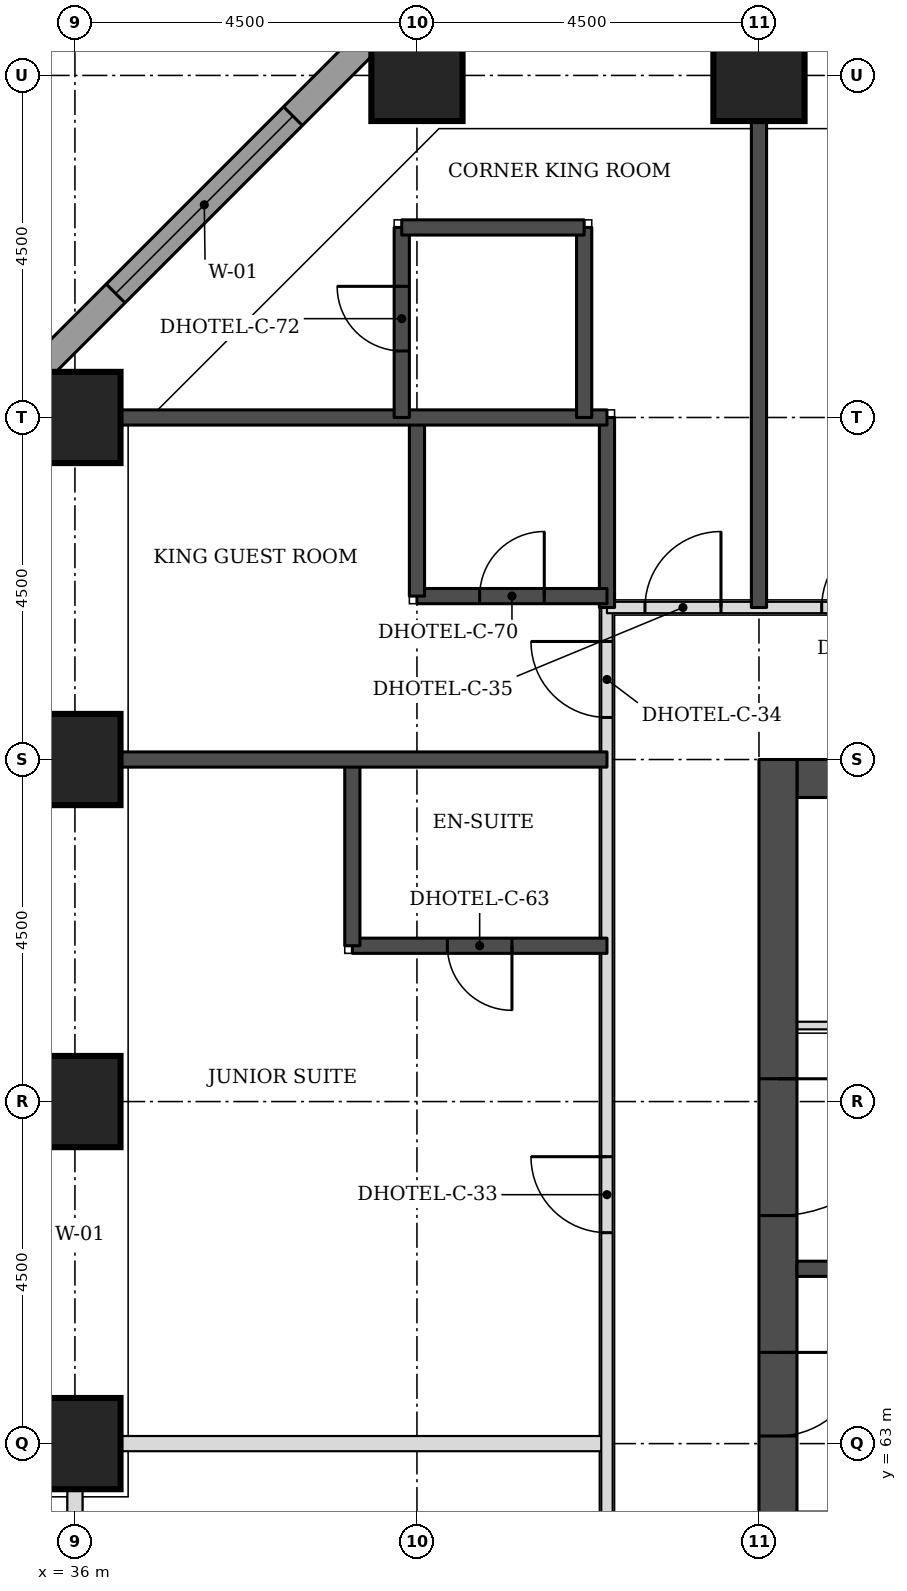
"""IFC4 building model, lengths in metres.
Left out: names, types, materials, properties, quantities, classifications, styles, units other than length and angle.
Written with IfcOpenShell. Run it as: python <this file> out.ifc"""

import sys

from ifc_helpers import new_model, si_unit, direction, frame, frame_2d, origin, origin_2d, place, context, subcontext, project, spatial, rectangle, extrude, element, fill, save


model = new_model("IFC4")
c1 = context("Model", 3, precision=1e-05, world=origin(), true_north=direction((0.0, 1.0)))
c2 = subcontext(c1, "Body", "Model", "MODEL_VIEW")
j1 = project(units=[si_unit("LENGTHUNIT", "METRE"), si_unit("PLANEANGLEUNIT", "RADIAN")], contexts=[c1])
p1 = place(None, origin())
s1 = spatial("IfcSite", under=j1, at=p1, CompositionType="ELEMENT")
p2 = place(p1, origin())
s2 = spatial("IfcBuilding", under=s1, at=p2, CompositionType="ELEMENT")
p3 = place(p2, frame((0.0, 0.0, 56.1)))
s3 = spatial("IfcBuildingStorey", under=s2, at=p3, CompositionType="ELEMENT", Elevation=56.1)
for number, where, z_axis, x_axis in (
    (1, (36.0, 63.0, 0.0), (0.0, 0.0, 1.0), (1.0, 0.0, 0.0)),
    (2, (36.0, 67.5, 0.0), (0.0, 0.0, 1.0), (1.0, 0.0, 0.0)),
    (3, (36.0, 72.0, 0.0), (0.0, 0.0, 1.0), (1.0, 0.0, 0.0)),
    (4, (36.0, 76.5, 0.0), (0.0, 0.0, 1.0), (1.0, 0.0, 0.0)),
    (5, (40.5, 81.0, 0.0), (0.0, 0.0, 1.0), (1.0, 0.0, 0.0)),
    (6, (45.0, 81.0, 0.0), (0.0, 0.0, 1.0), (1.0, 0.0, 0.0)),
):
    element("IfcColumn", number, at=place(p3, frame(where, z_axis=z_axis, x_axis=x_axis)), inside=s3, PredefinedType="COLUMN", context=c2, shape_type="SweptSolid", body=[
        extrude(rectangle(XDim=1.2, YDim=1.2, at=origin_2d()), origin(), (0.0, 0.0, 1.0), 3.3),
    ])
p4 = place(p3, frame((45.5, 71.75, 0.0), z_axis=(0.0, 0.0, 1.0), x_axis=(1.0, 0.0, 0.0)))
e7 = element("IfcWall", 7, at=p4, inside=s3, PredefinedType="SHEAR", context=c2, shape_type="SweptSolid", body=[
    extrude(rectangle(XDim=21.5, YDim=0.5, at=frame_2d((10.75, 0.0))), origin(), (0.0, 0.0, 1.0), 3.3),
])
p5 = place(p3, frame((45.25, 49.5, 0.0), z_axis=(0.0, 0.0, 1.0), x_axis=(0.0, 1.0, 0.0)))
e8 = element("IfcWall", 8, at=p5, inside=s3, PredefinedType="SHEAR", context=c2, shape_type="SweptSolid", body=[
    extrude(rectangle(XDim=22.5, YDim=0.5, at=frame_2d((11.25, 0.0))), origin(), (0.0, 0.0, 1.0), 3.3),
])
p6 = place(p5, frame((4.2, 0.0, 0.0)))
e9 = element("IfcOpeningElement", 9, at=p6, cuts=e8, PredefinedType="OPENING", context=c2, shape_type="SweptSolid", body=[
    extrude(rectangle(XDim=1.8, YDim=2.1, at=frame_2d((0.9, 1.05))), frame((0.0, 0.26, 0.0), z_axis=(0.0, -1.0, 0.0), x_axis=(1.0, 0.0, 0.0)), (0.0, 0.0, 1.0), 0.52),
])
p7 = place(p5, frame((6.9, 0.0, 0.0)))
e10 = element("IfcOpeningElement", 10, at=p7, cuts=e8, PredefinedType="OPENING", context=c2, shape_type="SweptSolid", body=[
    extrude(rectangle(XDim=1.1, YDim=2.1, at=frame_2d((0.55, 1.05))), frame((0.0, 0.26, 0.0), z_axis=(0.0, -1.0, 0.0), x_axis=(1.0, 0.0, 0.0)), (0.0, 0.0, 1.0), 0.52),
])
p8 = place(p5, frame((13.6, 0.0, 0.0)))
e11 = element("IfcOpeningElement", 11, at=p8, cuts=e8, PredefinedType="OPENING", context=c2, shape_type="SweptSolid", body=[
    extrude(rectangle(XDim=1.1, YDim=2.1, at=frame_2d((0.55, 1.05))), frame((0.0, 0.26, 0.0), z_axis=(0.0, -1.0, 0.0), x_axis=(1.0, 0.0, 0.0)), (0.0, 0.0, 1.0), 0.52),
])
p9 = place(p5, frame((16.5, 0.0, 0.0)))
e12 = element("IfcOpeningElement", 12, at=p9, cuts=e8, PredefinedType="OPENING", context=c2, shape_type="SweptSolid", body=[
    extrude(rectangle(XDim=1.8, YDim=2.1, at=frame_2d((0.9, 1.05))), frame((0.0, 0.26, 0.0), z_axis=(0.0, -1.0, 0.0), x_axis=(1.0, 0.0, 0.0)), (0.0, 0.0, 1.0), 0.52),
])
p10 = place(p3, frame((40.23, 81.826, 0.0), z_axis=(0.0, 0.0, 1.0), x_axis=(-0.707106781187, -0.707106781187, 0.0)))
e13 = element("IfcWall", 13, at=p10, inside=s3, PredefinedType="STANDARD", context=c2, shape_type="SweptSolid", body=[
    extrude(rectangle(XDim=7.151, YDim=0.35, at=frame_2d((3.576, 0.0))), origin(), (0.0, 0.0, 1.0), 3.055),
])
p11 = place(p10, frame((1.926, 0.0, 0.8)))
e14 = element("IfcOpeningElement", 14, at=p11, cuts=e13, PredefinedType="OPENING", context=c2, shape_type="SweptSolid", body=[
    extrude(rectangle(XDim=3.3, YDim=1.5, at=frame_2d((1.65, 0.75))), frame((0.0, 0.185, 0.0), z_axis=(0.0, -1.0, 0.0), x_axis=(1.0, 0.0, 0.0)), (0.0, 0.0, 1.0), 0.37),
])
p12 = place(p3, frame((36.0, 56.0, 0.0), z_axis=(0.0, 0.0, 1.0), x_axis=(0.0, 1.0, 0.0)))
e15 = element("IfcWall", 15, at=p12, inside=s3, PredefinedType="PARTITIONING", context=c2, shape_type="SweptSolid", body=[
    extrude(rectangle(XDim=6.4, YDim=0.2, at=frame_2d((3.2, 0.0))), origin(), (0.0, 0.0, 1.0), 2.33),
])
p13 = place(p3, frame((36.6, 63.0, 0.0), z_axis=(0.0, 0.0, 1.0), x_axis=(1.0, 0.0, 0.0)))
e16 = element("IfcWall", 16, at=p13, inside=s3, PredefinedType="PARTITIONING", context=c2, shape_type="SweptSolid", body=[
    extrude(rectangle(XDim=6.4, YDim=0.2, at=frame_2d((3.2, 0.0))), origin(), (0.0, 0.0, 1.0), 3.08),
])
p14 = place(p3, frame((43.0, 56.0, 0.0), z_axis=(0.0, 0.0, 1.0), x_axis=(0.0, 1.0, 0.0)))
e17 = element("IfcWall", 17, at=p14, inside=s3, PredefinedType="PARTITIONING", context=c2, shape_type="SweptSolid", body=[
    extrude(rectangle(XDim=18.0, YDim=0.15, at=frame_2d((9.0, 0.0))), origin(), (0.0, 0.0, 1.0), 3.08),
])
p15 = place(p14, frame((9.775, 0.0, 0.0)))
e18 = element("IfcOpeningElement", 18, at=p15, cuts=e17, PredefinedType="OPENING", context=c2, shape_type="SweptSolid", body=[
    extrude(rectangle(XDim=1.0, YDim=2.1, at=frame_2d((0.5, 1.05))), frame((0.0, 0.085, 0.0), z_axis=(0.0, -1.0, 0.0), x_axis=(1.0, 0.0, 0.0)), (0.0, 0.0, 1.0), 0.17),
])
p16 = place(p14, frame((16.553, 0.0, 0.0)))
e19 = element("IfcOpeningElement", 19, at=p16, cuts=e17, PredefinedType="OPENING", context=c2, shape_type="SweptSolid", body=[
    extrude(rectangle(XDim=1.0, YDim=2.1, at=frame_2d((0.5, 1.05))), frame((0.0, 0.085, 0.0), z_axis=(0.0, -1.0, 0.0), x_axis=(1.0, 0.0, 0.0)), (0.0, 0.0, 1.0), 0.17),
])
p17 = place(p14, frame((3.05, 0.0, 0.0)))
e20 = element("IfcOpeningElement", 20, at=p17, cuts=e17, PredefinedType="OPENING", context=c2, shape_type="SweptSolid", body=[
    extrude(rectangle(XDim=0.9, YDim=2.1, at=frame_2d((0.45, 1.05))), frame((0.0, 0.085, 0.0), z_axis=(0.0, -1.0, 0.0), x_axis=(1.0, 0.0, 0.0)), (0.0, 0.0, 1.0), 0.17),
])
p18 = place(p3, frame((43.0, 74.0, 0.0), z_axis=(0.0, 0.0, 1.0), x_axis=(1.0, 0.0, 0.0)))
e21 = element("IfcWall", 21, at=p18, inside=s3, PredefinedType="PARTITIONING", context=c2, shape_type="SweptSolid", body=[
    extrude(rectangle(XDim=26.5, YDim=0.15, at=frame_2d((13.25, 0.0))), origin(), (0.0, 0.0, 1.0), 3.08),
])
p19 = place(p18, frame((2.825, 0.0, 0.0)))
e22 = element("IfcOpeningElement", 22, at=p19, cuts=e21, PredefinedType="OPENING", context=c2, shape_type="SweptSolid", body=[
    extrude(rectangle(XDim=1.0, YDim=2.1, at=frame_2d((0.5, 1.05))), frame((0.0, 0.085, 0.0), z_axis=(0.0, -1.0, 0.0), x_axis=(1.0, 0.0, 0.0)), (0.0, 0.0, 1.0), 0.17),
])
p20 = place(p18, frame((9.425, 0.0, 0.0)))
e23 = element("IfcOpeningElement", 23, at=p20, cuts=e21, PredefinedType="OPENING", context=c2, shape_type="SweptSolid", body=[
    extrude(rectangle(XDim=1.0, YDim=2.1, at=frame_2d((0.5, 1.05))), frame((0.0, 0.085, 0.0), z_axis=(0.0, -1.0, 0.0), x_axis=(1.0, 0.0, 0.0)), (0.0, 0.0, 1.0), 0.17),
])
p21 = place(p18, frame((11.825, 0.0, 0.0)))
e24 = element("IfcOpeningElement", 24, at=p21, cuts=e21, PredefinedType="OPENING", context=c2, shape_type="SweptSolid", body=[
    extrude(rectangle(XDim=1.0, YDim=2.1, at=frame_2d((0.5, 1.05))), frame((0.0, 0.085, 0.0), z_axis=(0.0, -1.0, 0.0), x_axis=(1.0, 0.0, 0.0)), (0.0, 0.0, 1.0), 0.17),
])
p22 = place(p18, frame((18.425, 0.0, 0.0)))
e25 = element("IfcOpeningElement", 25, at=p22, cuts=e21, PredefinedType="OPENING", context=c2, shape_type="SweptSolid", body=[
    extrude(rectangle(XDim=1.0, YDim=2.1, at=frame_2d((0.5, 1.05))), frame((0.0, 0.085, 0.0), z_axis=(0.0, -1.0, 0.0), x_axis=(1.0, 0.0, 0.0)), (0.0, 0.0, 1.0), 0.17),
])
p23 = place(p18, frame((20.825, 0.0, 0.0)))
e26 = element("IfcOpeningElement", 26, at=p23, cuts=e21, PredefinedType="OPENING", context=c2, shape_type="SweptSolid", body=[
    extrude(rectangle(XDim=1.0, YDim=2.1, at=frame_2d((0.5, 1.05))), frame((0.0, 0.085, 0.0), z_axis=(0.0, -1.0, 0.0), x_axis=(1.0, 0.0, 0.0)), (0.0, 0.0, 1.0), 0.17),
])
p24 = place(p18, frame((0.5, 0.0, 0.0)))
e27 = element("IfcOpeningElement", 27, at=p24, cuts=e21, PredefinedType="OPENING", context=c2, shape_type="SweptSolid", body=[
    extrude(rectangle(XDim=1.0, YDim=2.1, at=frame_2d((0.5, 1.05))), frame((0.0, 0.085, 0.0), z_axis=(0.0, -1.0, 0.0), x_axis=(1.0, 0.0, 0.0)), (0.0, 0.0, 1.0), 0.17),
])
p25 = place(p18, frame((25.0, 0.0, 0.0)))
e28 = element("IfcOpeningElement", 28, at=p25, cuts=e21, PredefinedType="OPENING", context=c2, shape_type="SweptSolid", body=[
    extrude(rectangle(XDim=1.0, YDim=2.1, at=frame_2d((0.5, 1.05))), frame((0.0, 0.085, 0.0), z_axis=(0.0, -1.0, 0.0), x_axis=(1.0, 0.0, 0.0)), (0.0, 0.0, 1.0), 0.17),
])
p26 = place(p3, frame((39.65, 69.55, 0.0), z_axis=(0.0, 0.0, 1.0), x_axis=(1.0, 0.0, 0.0)))
e29 = element("IfcWall", 29, at=p26, inside=s3, PredefinedType="SOLIDWALL", context=c2, shape_type="SweptSolid", body=[
    extrude(rectangle(XDim=3.35, YDim=0.2, at=frame_2d((1.675, 0.0))), origin(), (0.0, 0.0, 1.0), 3.08),
])
p27 = place(p26, frame((1.25, 0.0, 0.0)))
e30 = element("IfcOpeningElement", 30, at=p27, cuts=e29, PredefinedType="OPENING", context=c2, shape_type="SweptSolid", body=[
    extrude(rectangle(XDim=0.85, YDim=2.1, at=frame_2d((0.425, 1.05))), frame((0.0, 0.11, 0.0), z_axis=(0.0, -1.0, 0.0), x_axis=(1.0, 0.0, 0.0)), (0.0, 0.0, 1.0), 0.22),
])
p28 = place(p3, frame((39.65, 69.55, 0.0), z_axis=(0.0, 0.0, 1.0), x_axis=(0.0, 1.0, 0.0)))
e31 = element("IfcWall", 31, at=p28, inside=s3, PredefinedType="SOLIDWALL", context=c2, shape_type="SweptSolid", body=[
    extrude(rectangle(XDim=2.45, YDim=0.2, at=frame_2d((1.225, 0.0))), origin(), (0.0, 0.0, 1.0), 3.08),
])
p29 = place(p3, frame((36.6, 72.0, 0.0), z_axis=(0.0, 0.0, 1.0), x_axis=(1.0, 0.0, 0.0)))
e32 = element("IfcWall", 32, at=p29, inside=s3, PredefinedType="SOLIDWALL", context=c2, shape_type="SweptSolid", body=[
    extrude(rectangle(XDim=6.4, YDim=0.2, at=frame_2d((3.2, 0.0))), origin(), (0.0, 0.0, 1.0), 3.08),
])
p30 = place(p3, frame((43.0, 74.0, 0.0), z_axis=(0.0, 0.0, 1.0), x_axis=(0.0, 1.0, 0.0)))
e33 = element("IfcWall", 33, at=p30, inside=s3, PredefinedType="SOLIDWALL", context=c2, shape_type="SweptSolid", body=[
    extrude(rectangle(XDim=2.5, YDim=0.2, at=frame_2d((1.25, 0.0))), origin(), (0.0, 0.0, 1.0), 3.08),
])
p31 = place(p3, frame((45.0, 74.0, 0.0), z_axis=(0.0, 0.0, 1.0), x_axis=(0.0, 1.0, 0.0)))
e34 = element("IfcWall", 34, at=p31, inside=s3, PredefinedType="SOLIDWALL", context=c2, shape_type="SweptSolid", body=[
    extrude(rectangle(XDim=6.4, YDim=0.2, at=frame_2d((3.2, 0.0))), origin(), (0.0, 0.0, 1.0), 3.08),
])
p32 = place(p3, frame((40.5, 74.15, 0.0), z_axis=(0.0, 0.0, 1.0), x_axis=(1.0, 0.0, 0.0)))
e35 = element("IfcWall", 35, at=p32, inside=s3, PredefinedType="SOLIDWALL", context=c2, shape_type="SweptSolid", body=[
    extrude(rectangle(XDim=2.5, YDim=0.2, at=frame_2d((1.25, 0.0))), origin(), (0.0, 0.0, 1.0), 3.08),
])
p33 = place(p32, frame((0.825, 0.0, 0.0)))
e36 = element("IfcOpeningElement", 36, at=p33, cuts=e35, PredefinedType="OPENING", context=c2, shape_type="SweptSolid", body=[
    extrude(rectangle(XDim=0.85, YDim=2.1, at=frame_2d((0.425, 1.05))), frame((0.0, 0.11, 0.0), z_axis=(0.0, -1.0, 0.0), x_axis=(1.0, 0.0, 0.0)), (0.0, 0.0, 1.0), 0.22),
])
p34 = place(p3, frame((40.5, 74.15, 0.0), z_axis=(0.0, 0.0, 1.0), x_axis=(0.0, 1.0, 0.0)))
e37 = element("IfcWall", 37, at=p34, inside=s3, PredefinedType="SOLIDWALL", context=c2, shape_type="SweptSolid", body=[
    extrude(rectangle(XDim=2.35, YDim=0.2, at=frame_2d((1.175, 0.0))), origin(), (0.0, 0.0, 1.0), 3.08),
])
p35 = place(p3, frame((36.6, 76.5, 0.0), z_axis=(0.0, 0.0, 1.0), x_axis=(1.0, 0.0, 0.0)))
e38 = element("IfcWall", 38, at=p35, inside=s3, PredefinedType="SOLIDWALL", context=c2, shape_type="SweptSolid", body=[
    extrude(rectangle(XDim=6.4, YDim=0.2, at=frame_2d((3.2, 0.0))), origin(), (0.0, 0.0, 1.0), 3.08),
])
p36 = place(p3, frame((40.3, 76.5, 0.0), z_axis=(0.0, 0.0, 1.0), x_axis=(0.0, 1.0, 0.0)))
e39 = element("IfcWall", 39, at=p36, inside=s3, PredefinedType="SOLIDWALL", context=c2, shape_type="SweptSolid", body=[
    extrude(rectangle(XDim=2.5, YDim=0.2, at=frame_2d((1.25, 0.0))), origin(), (0.0, 0.0, 1.0), 3.08),
])
p37 = place(p36, frame((0.875, 0.0, 0.0)))
e40 = element("IfcOpeningElement", 40, at=p37, cuts=e39, PredefinedType="OPENING", context=c2, shape_type="SweptSolid", body=[
    extrude(rectangle(XDim=0.85, YDim=2.1, at=frame_2d((0.425, 1.05))), frame((0.0, 0.11, 0.0), z_axis=(0.0, -1.0, 0.0), x_axis=(1.0, 0.0, 0.0)), (0.0, 0.0, 1.0), 0.22),
])
p38 = place(p3, frame((42.7, 76.5, 0.0), z_axis=(0.0, 0.0, 1.0), x_axis=(0.0, 1.0, 0.0)))
e41 = element("IfcWall", 41, at=p38, inside=s3, PredefinedType="SOLIDWALL", context=c2, shape_type="SweptSolid", body=[
    extrude(rectangle(XDim=2.5, YDim=0.2, at=frame_2d((1.25, 0.0))), origin(), (0.0, 0.0, 1.0), 3.08),
])
p39 = place(p3, frame((40.3, 79.0, 0.0), z_axis=(0.0, 0.0, 1.0), x_axis=(1.0, 0.0, 0.0)))
e42 = element("IfcWall", 42, at=p39, inside=s3, PredefinedType="SOLIDWALL", context=c2, shape_type="SweptSolid", body=[
    extrude(rectangle(XDim=2.4, YDim=0.2, at=frame_2d((1.2, 0.0))), origin(), (0.0, 0.0, 1.0), 3.08),
])
p40 = place(p3, frame((45.5, 65.3, 0.0), z_axis=(0.0, 0.0, 1.0), x_axis=(1.0, 0.0, 0.0)))
e43 = element("IfcWall", 43, at=p40, inside=s3, PredefinedType="SOLIDWALL", context=c2, shape_type="SweptSolid", body=[
    extrude(rectangle(XDim=2.3, YDim=0.2, at=frame_2d((1.15, 0.0))), origin(), (0.0, 0.0, 1.0), 3.08),
])
p41 = place(p3, frame((45.5, 68.5, 0.0), z_axis=(0.0, 0.0, 1.0), x_axis=(1.0, 0.0, 0.0)))
e44 = element("IfcWall", 44, at=p41, inside=s3, PredefinedType="PARTITIONING", context=c2, shape_type="SweptSolid", body=[
    extrude(rectangle(XDim=5.15, YDim=0.1, at=frame_2d((2.575, 0.0))), origin(), (0.0, 0.0, 1.0), 3.08),
])
p42 = place(p41, frame((0.837, 0.0, 0.0)))
e45 = element("IfcOpeningElement", 45, at=p42, cuts=e44, PredefinedType="OPENING", context=c2, shape_type="SweptSolid", body=[
    extrude(rectangle(XDim=0.9, YDim=2.1, at=frame_2d((0.45, 1.05))), frame((0.0, 0.06, 0.0), z_axis=(0.0, -1.0, 0.0), x_axis=(1.0, 0.0, 0.0)), (0.0, 0.0, 1.0), 0.12),
])
p43 = place(p41, frame((3.413, 0.0, 0.0)))
e46 = element("IfcOpeningElement", 46, at=p43, cuts=e44, PredefinedType="OPENING", context=c2, shape_type="SweptSolid", body=[
    extrude(rectangle(XDim=0.9, YDim=2.1, at=frame_2d((0.45, 1.05))), frame((0.0, 0.06, 0.0), z_axis=(0.0, -1.0, 0.0), x_axis=(1.0, 0.0, 0.0)), (0.0, 0.0, 1.0), 0.12),
])
p44 = place(p11, origin())
e47 = element("IfcWindow", 47, at=p44, inside=s3, PartitioningType="SINGLE_PANEL", PredefinedType="WINDOW", context=c2, shape_type="SweptSolid", body=[
    extrude(rectangle(XDim=3.3, YDim=1.5, at=frame_2d((1.65, 0.75))), frame((0.0, 0.085, 0.0), z_axis=(0.0, -1.0, 0.0), x_axis=(1.0, 0.0, 0.0)), (0.0, 0.0, 1.0), 0.06),
])
fill(e14, e47)
p45 = place(p15, origin())
e48 = element("IfcDoor", 48, at=p45, inside=s3, OperationType="SINGLE_SWING_RIGHT", PredefinedType="DOOR", context=c2, shape_type="SweptSolid", body=[
    extrude(rectangle(XDim=1.0, YDim=2.1, at=frame_2d((0.5, 1.05))), frame((0.0, 0.025, 0.0), z_axis=(0.0, -1.0, 0.0), x_axis=(1.0, 0.0, 0.0)), (0.0, 0.0, 1.0), 0.05),
])
fill(e18, e48)
p46 = place(p27, frame((0.85, 0.0, 0.0), z_axis=(0.0, 0.0, 1.0), x_axis=(-1.0, 0.0, 0.0)))
e49 = element("IfcDoor", 49, at=p46, inside=s3, OperationType="SINGLE_SWING_LEFT", PredefinedType="DOOR", context=c2, shape_type="SweptSolid", body=[
    extrude(rectangle(XDim=0.85, YDim=2.1, at=frame_2d((0.425, 1.05))), frame((0.0, 0.025, 0.0), z_axis=(0.0, -1.0, 0.0), x_axis=(1.0, 0.0, 0.0)), (0.0, 0.0, 1.0), 0.05),
])
fill(e30, e49)
p47 = place(p16, origin())
e50 = element("IfcDoor", 50, at=p47, inside=s3, OperationType="SINGLE_SWING_RIGHT", PredefinedType="DOOR", context=c2, shape_type="SweptSolid", body=[
    extrude(rectangle(XDim=1.0, YDim=2.1, at=frame_2d((0.5, 1.05))), frame((0.0, 0.025, 0.0), z_axis=(0.0, -1.0, 0.0), x_axis=(1.0, 0.0, 0.0)), (0.0, 0.0, 1.0), 0.05),
])
fill(e19, e50)
p48 = place(p33, origin())
e51 = element("IfcDoor", 51, at=p48, inside=s3, OperationType="SINGLE_SWING_RIGHT", PredefinedType="DOOR", context=c2, shape_type="SweptSolid", body=[
    extrude(rectangle(XDim=0.85, YDim=2.1, at=frame_2d((0.425, 1.05))), frame((0.0, 0.025, 0.0), z_axis=(0.0, -1.0, 0.0), x_axis=(1.0, 0.0, 0.0)), (0.0, 0.0, 1.0), 0.05),
])
fill(e36, e51)
p49 = place(p19, origin())
e52 = element("IfcDoor", 52, at=p49, inside=s3, OperationType="SINGLE_SWING_RIGHT", PredefinedType="DOOR", context=c2, shape_type="SweptSolid", body=[
    extrude(rectangle(XDim=1.0, YDim=2.1, at=frame_2d((0.5, 1.05))), frame((0.0, 0.025, 0.0), z_axis=(0.0, -1.0, 0.0), x_axis=(1.0, 0.0, 0.0)), (0.0, 0.0, 1.0), 0.05),
])
fill(e22, e52)
p50 = place(p24, origin())
e53 = element("IfcDoor", 53, at=p50, inside=s3, OperationType="SINGLE_SWING_RIGHT", PredefinedType="DOOR", context=c2, shape_type="SweptSolid", body=[
    extrude(rectangle(XDim=1.0, YDim=2.1, at=frame_2d((0.5, 1.05))), frame((0.0, 0.025, 0.0), z_axis=(0.0, -1.0, 0.0), x_axis=(1.0, 0.0, 0.0)), (0.0, 0.0, 1.0), 0.05),
])
fill(e27, e53)
p51 = place(p37, origin())
e54 = element("IfcDoor", 54, at=p51, inside=s3, OperationType="SINGLE_SWING_RIGHT", PredefinedType="DOOR", context=c2, shape_type="SweptSolid", body=[
    extrude(rectangle(XDim=0.85, YDim=2.1, at=frame_2d((0.425, 1.05))), frame((0.0, 0.025, 0.0), z_axis=(0.0, -1.0, 0.0), x_axis=(1.0, 0.0, 0.0)), (0.0, 0.0, 1.0), 0.05),
])
fill(e40, e54)
p52 = place(p8, frame((1.1, 0.0, 0.0), z_axis=(0.0, 0.0, 1.0), x_axis=(-1.0, 0.0, 0.0)))
e55 = element("IfcDoor", 55, at=p52, inside=s3, OperationType="SINGLE_SWING_LEFT", PredefinedType="DOOR", context=c2, shape_type="SweptSolid", body=[
    extrude(rectangle(XDim=1.1, YDim=2.1, at=frame_2d((0.55, 1.05))), frame((0.0, 0.025, 0.0), z_axis=(0.0, -1.0, 0.0), x_axis=(1.0, 0.0, 0.0)), (0.0, 0.0, 1.0), 0.05),
])
fill(e11, e55)
p53 = place(p9, frame((1.8, 0.0, 0.0), z_axis=(0.0, 0.0, 1.0), x_axis=(-1.0, 0.0, 0.0)))
e56 = element("IfcDoor", 56, at=p53, inside=s3, OperationType="SINGLE_SWING_LEFT", PredefinedType="DOOR", context=c2, shape_type="SweptSolid", body=[
    extrude(rectangle(XDim=1.8, YDim=2.1, at=frame_2d((0.9, 1.05))), frame((0.0, 0.025, 0.0), z_axis=(0.0, -1.0, 0.0), x_axis=(1.0, 0.0, 0.0)), (0.0, 0.0, 1.0), 0.05),
])
fill(e12, e56)
save(model, sys.argv[1])
